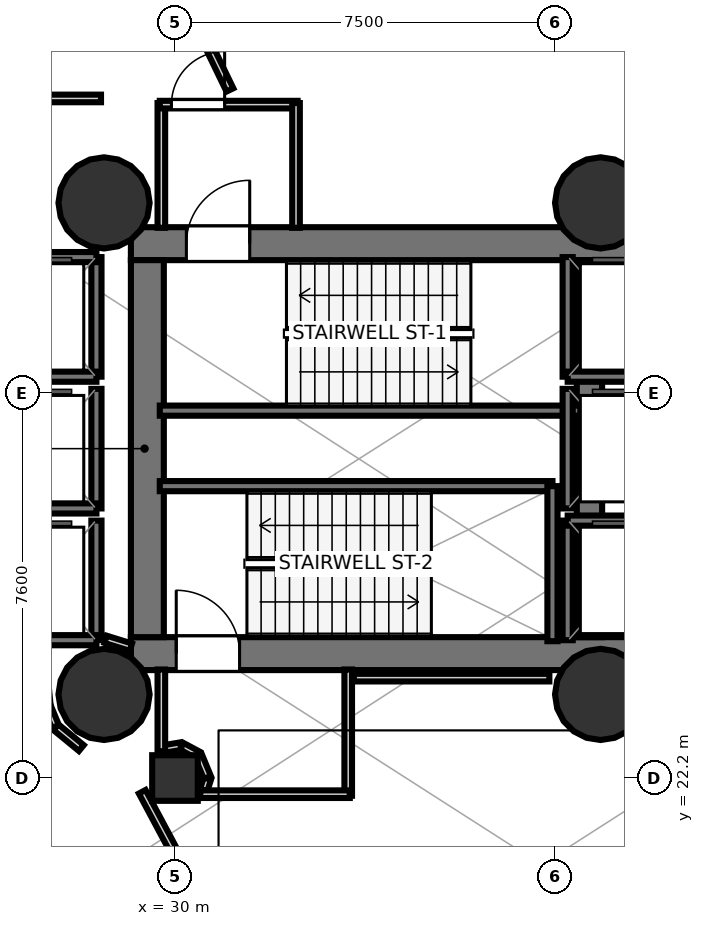
"""IFC4 building model, lengths in metres.
Left out: names, types, materials, properties, quantities, classifications, styles, units other than length and angle.
Written with IfcOpenShell. Run it as: python <this file> out.ifc"""

import sys

from ifc_helpers import new_model, si_unit, direction, frame, frame_2d, origin, origin_2d, place, context, subcontext, project, spatial, rectangle, hollow_circle, extrude, element, fill, save


model = new_model("IFC4")
c1 = context("Model", 3, precision=1e-05, world=origin(), true_north=direction((0.0, 1.0)))
c2 = subcontext(c1, "Body", "Model", "MODEL_VIEW")
j1 = project(units=[si_unit("LENGTHUNIT", "METRE"), si_unit("PLANEANGLEUNIT", "RADIAN")], contexts=[c1])
p1 = place(None, origin())
s1 = spatial("IfcSite", under=j1, at=p1, CompositionType="ELEMENT")
p2 = place(p1, origin())
s2 = spatial("IfcBuilding", under=s1, at=p2, CompositionType="ELEMENT")
p3 = place(p2, frame((0.0, 0.0, 15.8)))
s3 = spatial("IfcBuildingStorey", under=s2, at=p3, CompositionType="ELEMENT", Elevation=15.8)
p4 = place(p3, frame((29.13, 32.745, 0.0), z_axis=(0.0, 0.0, 1.0), x_axis=(1.0, 0.0, 0.0)))
e1 = element("IfcWall", 1, at=p4, inside=s3, PredefinedType="SHEAR", context=c2, shape_type="SweptSolid", body=[
    extrude(rectangle(XDim=10.72, YDim=0.65, at=frame_2d((5.36, 0.0))), origin(), (0.0, 0.0, 1.0), 4.5),
])
p5 = place(p4, frame((1.095, 0.0, 0.0)))
e2 = element("IfcOpeningElement", 2, at=p5, cuts=e1, PredefinedType="OPENING", context=c2, shape_type="SweptSolid", body=[
    extrude(rectangle(XDim=1.25, YDim=2.15, at=frame_2d((0.625, 1.075))), frame((0.0, 0.335, 0.0), z_axis=(0.0, -1.0, 0.0), x_axis=(1.0, 0.0, 0.0)), (0.0, 0.0, 1.0), 0.67),
])
p6 = place(p3, frame((29.13, 24.655, 0.0), z_axis=(0.0, 0.0, 1.0), x_axis=(1.0, 0.0, 0.0)))
e3 = element("IfcWall", 3, at=p6, inside=s3, PredefinedType="SHEAR", context=c2, shape_type="SweptSolid", body=[
    extrude(rectangle(XDim=10.72, YDim=0.65, at=frame_2d((5.36, 0.0))), origin(), (0.0, 0.0, 1.0), 4.5),
])
p7 = place(p6, frame((0.895, 0.0, 0.0)))
e4 = element("IfcOpeningElement", 4, at=p7, cuts=e3, PredefinedType="OPENING", context=c2, shape_type="SweptSolid", body=[
    extrude(rectangle(XDim=1.25, YDim=2.15, at=frame_2d((0.625, 1.075))), frame((0.0, 0.335, 0.0), z_axis=(0.0, -1.0, 0.0), x_axis=(1.0, 0.0, 0.0)), (0.0, 0.0, 1.0), 0.67),
])
p8 = place(p3, frame((29.455, 24.98, 0.0), z_axis=(0.0, 0.0, 1.0), x_axis=(0.0, 1.0, 0.0)))
e5 = element("IfcWall", 5, at=p8, inside=s3, PredefinedType="SHEAR", context=c2, shape_type="SweptSolid", body=[
    extrude(rectangle(XDim=7.44, YDim=0.65, at=frame_2d((3.72, 0.0))), origin(), (0.0, 0.0, 1.0), 4.5),
])
p9 = place(p3, frame((38.18, 24.98, 0.0), z_axis=(0.0, 0.0, 1.0), x_axis=(0.0, 1.0, 0.0)))
e6 = element("IfcWall", 6, at=p9, inside=s3, PredefinedType="SHEAR", context=c2, shape_type="SweptSolid", body=[
    extrude(rectangle(XDim=7.44, YDim=0.5, at=frame_2d((3.72, 0.0))), origin(), (0.0, 0.0, 1.0), 4.5),
])
for number, where, z_axis, x_axis in (
    (7, (28.6, 33.55, 0.0), (0.0, 0.0, 1.0), (1.0, 0.0, 0.0)),
    (8, (28.6, 23.85, 0.0), (0.0, 0.0, 1.0), (1.0, 0.0, 0.0)),
    (9, (38.4, 33.55, 0.0), (0.0, 0.0, 1.0), (1.0, 0.0, 0.0)),
    (10, (38.4, 23.85, 0.0), (0.0, 0.0, 1.0), (1.0, 0.0, 0.0)),
):
    element("IfcColumn", number, at=place(p3, frame(where, z_axis=z_axis, x_axis=x_axis)), inside=s3, PredefinedType="COLUMN", context=c2, shape_type="SweptSolid", body=[
        extrude(hollow_circle(Radius=0.9, WallThickness=0.045, at=origin_2d()), origin(), (0.0, 0.0, 1.0), 4.8),
    ])
p10 = place(p3, frame((30.0, 22.2, 0.0), z_axis=(0.0, 0.0, 1.0), x_axis=(1.0, 0.0, 0.0)))
e11 = element("IfcColumn", 11, at=p10, inside=s3, PredefinedType="COLUMN", context=c2, shape_type="SweptSolid", body=[
    extrude(rectangle(XDim=0.9, YDim=0.9, at=origin_2d()), origin(), (0.0, 0.0, 1.0), 4.8),
])
p11 = place(p3, frame((29.7, 29.45, 0.0), z_axis=(0.0, 0.0, 1.0), x_axis=(1.0, 0.0, 0.0)))
e12 = element("IfcWall", 12, at=p11, inside=s3, PredefinedType="SOLIDWALL", context=c2, shape_type="SweptSolid", body=[
    extrude(rectangle(XDim=8.3, YDim=0.2, at=frame_2d((4.15, 0.0))), origin(), (0.0, 0.0, 1.0), 4.5),
])
p12 = place(p3, frame((29.7, 27.96, 0.0), z_axis=(0.0, 0.0, 1.0), x_axis=(1.0, 0.0, 0.0)))
e13 = element("IfcWall", 13, at=p12, inside=s3, PredefinedType="SOLIDWALL", context=c2, shape_type="SweptSolid", body=[
    extrude(rectangle(XDim=7.75, YDim=0.2, at=frame_2d((3.875, 0.0))), origin(), (0.0, 0.0, 1.0), 4.5),
])
p13 = place(p3, frame((37.45, 24.9, 0.0), z_axis=(0.0, 0.0, 1.0), x_axis=(0.0, 1.0, 0.0)))
e14 = element("IfcWall", 14, at=p13, inside=s3, PredefinedType="SOLIDWALL", context=c2, shape_type="SweptSolid", body=[
    extrude(rectangle(XDim=3.06, YDim=0.2, at=frame_2d((1.53, 0.0))), origin(), (0.0, 0.0, 1.0), 4.5),
])
p14 = place(p3, frame((37.75, 30.12, 0.0), z_axis=(0.0, 0.0, 1.0), x_axis=(0.0, 1.0, 0.0)))
e15 = element("IfcWall", 15, at=p14, inside=s3, PredefinedType="SOLIDWALL", context=c2, shape_type="SweptSolid", body=[
    extrude(rectangle(XDim=2.36, YDim=0.2, at=frame_2d((1.18, 0.0))), origin(), (0.0, 0.0, 1.0), 4.5),
])
p15 = place(p3, frame((37.75, 30.12, 0.0), z_axis=(0.0, 0.0, 1.0), x_axis=(1.0, 0.0, 0.0)))
e16 = element("IfcWall", 16, at=p15, inside=s3, PredefinedType="SOLIDWALL", context=c2, shape_type="SweptSolid", body=[
    extrude(rectangle(XDim=2.1, YDim=0.2, at=frame_2d((1.05, 0.0))), origin(), (0.0, 0.0, 1.0), 4.5),
])
p16 = place(p3, frame((37.75, 24.92, 0.0), z_axis=(0.0, 0.0, 1.0), x_axis=(0.0, 1.0, 0.0)))
e17 = element("IfcWall", 17, at=p16, inside=s3, PredefinedType="SOLIDWALL", context=c2, shape_type="SweptSolid", body=[
    extrude(rectangle(XDim=2.36, YDim=0.2, at=frame_2d((1.18, 0.0))), origin(), (0.0, 0.0, 1.0), 4.5),
])
p17 = place(p3, frame((37.75, 27.28, 0.0), z_axis=(0.0, 0.0, 1.0), x_axis=(1.0, 0.0, 0.0)))
e18 = element("IfcWall", 18, at=p17, inside=s3, PredefinedType="SOLIDWALL", context=c2, shape_type="SweptSolid", body=[
    extrude(rectangle(XDim=2.1, YDim=0.2, at=frame_2d((1.05, 0.0))), origin(), (0.0, 0.0, 1.0), 4.5),
])
p18 = place(p3, frame((28.45, 30.12, 0.0), z_axis=(0.0, 0.0, 1.0), x_axis=(0.0, 1.0, 0.0)))
e19 = element("IfcWall", 19, at=p18, inside=s3, PredefinedType="SOLIDWALL", context=c2, shape_type="SweptSolid", body=[
    extrude(rectangle(XDim=2.36, YDim=0.2, at=frame_2d((1.18, 0.0))), origin(), (0.0, 0.0, 1.0), 4.5),
])
for number, where, z_axis, x_axis in (
    (20, (26.35, 32.48, 0.0), (0.0, 0.0, 1.0), (1.0, 0.0, 0.0)),
    (21, (26.35, 30.12, 0.0), (0.0, 0.0, 1.0), (1.0, 0.0, 0.0)),
):
    element("IfcWall", number, at=place(p3, frame(where, z_axis=z_axis, x_axis=x_axis)), inside=s3, PredefinedType="SOLIDWALL", context=c2, shape_type="SweptSolid", body=[
        extrude(rectangle(XDim=2.1, YDim=0.2, at=frame_2d((1.05, 0.0))), origin(), (0.0, 0.0, 1.0), 4.5),
    ])
p19 = place(p3, frame((28.45, 27.52, 0.0), z_axis=(0.0, 0.0, 1.0), x_axis=(0.0, 1.0, 0.0)))
e22 = element("IfcWall", 22, at=p19, inside=s3, PredefinedType="SOLIDWALL", context=c2, shape_type="SweptSolid", body=[
    extrude(rectangle(XDim=2.36, YDim=0.2, at=frame_2d((1.18, 0.0))), origin(), (0.0, 0.0, 1.0), 4.5),
])
p20 = place(p3, frame((26.35, 27.52, 0.0), z_axis=(0.0, 0.0, 1.0), x_axis=(1.0, 0.0, 0.0)))
e23 = element("IfcWall", 23, at=p20, inside=s3, PredefinedType="SOLIDWALL", context=c2, shape_type="SweptSolid", body=[
    extrude(rectangle(XDim=2.1, YDim=0.2, at=frame_2d((1.05, 0.0))), origin(), (0.0, 0.0, 1.0), 4.5),
])
p21 = place(p3, frame((28.45, 24.92, 0.0), z_axis=(0.0, 0.0, 1.0), x_axis=(0.0, 1.0, 0.0)))
e24 = element("IfcWall", 24, at=p21, inside=s3, PredefinedType="SOLIDWALL", context=c2, shape_type="SweptSolid", body=[
    extrude(rectangle(XDim=2.36, YDim=0.2, at=frame_2d((1.18, 0.0))), origin(), (0.0, 0.0, 1.0), 4.5),
])
p22 = place(p3, frame((26.35, 24.92, 0.0), z_axis=(0.0, 0.0, 1.0), x_axis=(1.0, 0.0, 0.0)))
e25 = element("IfcWall", 25, at=p22, inside=s3, PredefinedType="SOLIDWALL", context=c2, shape_type="SweptSolid", body=[
    extrude(rectangle(XDim=2.1, YDim=0.2, at=frame_2d((1.05, 0.0))), origin(), (0.0, 0.0, 1.0), 4.5),
])
p23 = place(p3, frame((37.75, 27.52, 0.0), z_axis=(0.0, 0.0, 1.0), x_axis=(0.0, 1.0, 0.0)))
e26 = element("IfcWall", 26, at=p23, inside=s3, PredefinedType="SOLIDWALL", context=c2, shape_type="SweptSolid", body=[
    extrude(rectangle(XDim=2.36, YDim=0.2, at=frame_2d((1.18, 0.0))), origin(), (0.0, 0.0, 1.0), 4.5),
])
p24 = place(p3, frame((29.731, 33.058, 0.0), z_axis=(0.0, 0.0, 1.0), x_axis=(0.0, 1.0, 0.0)))
e27 = element("IfcWall", 27, at=p24, inside=s3, PredefinedType="PARTITIONING", context=c2, shape_type="SweptSolid", body=[
    extrude(rectangle(XDim=2.462, YDim=0.15, at=frame_2d((1.231, 0.0))), origin(), (0.0, 0.0, 1.0), 3.02),
])
p25 = place(p3, frame((29.7, 35.489, 0.0), z_axis=(0.0, 0.0, 1.0), x_axis=(1.0, 0.0, 0.0)))
e28 = element("IfcWall", 28, at=p25, inside=s3, PredefinedType="PARTITIONING", context=c2, shape_type="SweptSolid", body=[
    extrude(rectangle(XDim=2.72, YDim=0.15, at=frame_2d((1.36, 0.0))), origin(), (0.0, 0.0, 1.0), 3.02),
])
p26 = place(p25, frame((0.23, 0.0, 0.0)))
e29 = element("IfcOpeningElement", 29, at=p26, cuts=e28, PredefinedType="OPENING", context=c2, shape_type="SweptSolid", body=[
    extrude(rectangle(XDim=1.05, YDim=2.15, at=frame_2d((0.525, 1.075))), frame((0.0, 0.085, 0.0), z_axis=(0.0, -1.0, 0.0), x_axis=(1.0, 0.0, 0.0)), (0.0, 0.0, 1.0), 0.17),
])
p27 = place(p3, frame((32.389, 35.52, 0.0), z_axis=(0.0, 0.0, 1.0), x_axis=(0.0, -1.0, 0.0)))
e30 = element("IfcWall", 30, at=p27, inside=s3, PredefinedType="PARTITIONING", context=c2, shape_type="SweptSolid", body=[
    extrude(rectangle(XDim=2.462, YDim=0.15, at=frame_2d((1.231, 0.0))), origin(), (0.0, 0.0, 1.0), 3.02),
])
p28 = place(p3, frame((30.567, 21.964, 0.0), z_axis=(0.0, 0.0, 1.0), x_axis=(0.304515297416, 0.952507445451, 0.0)))
e31 = element("IfcWall", 31, at=p28, inside=s3, PredefinedType="PARTITIONING", context=c2, shape_type="SweptSolid", body=[
    extrude(rectangle(XDim=0.238, YDim=0.15, at=frame_2d((0.119, 0.0))), origin(), (0.0, 0.0, 1.0), 3.02),
])
p29 = place(p3, frame((30.639, 22.212, 0.0), z_axis=(0.0, 0.0, 1.0), x_axis=(-0.382721202621, 0.923863886655, 0.0)))
e32 = element("IfcWall", 32, at=p29, inside=s3, PredefinedType="PARTITIONING", context=c2, shape_type="SweptSolid", body=[
    extrude(rectangle(XDim=0.467, YDim=0.15, at=frame_2d((0.233, 0.0))), origin(), (0.0, 0.0, 1.0), 3.02),
])
p30 = place(p3, frame((30.446, 22.659, 0.0), z_axis=(0.0, 0.0, 1.0), x_axis=(-0.881817981942, 0.471589913721, 0.0)))
e33 = element("IfcWall", 33, at=p30, inside=s3, PredefinedType="PARTITIONING", context=c2, shape_type="SweptSolid", body=[
    extrude(rectangle(XDim=0.354, YDim=0.15, at=frame_2d((0.177, 0.0))), origin(), (0.0, 0.0, 1.0), 3.02),
])
p31 = place(p3, frame((30.114, 22.829, 0.0), z_axis=(0.0, 0.0, 1.0), x_axis=(-0.986222627979, -0.165423480989, 0.0)))
e34 = element("IfcWall", 34, at=p31, inside=s3, PredefinedType="PARTITIONING", context=c2, shape_type="SweptSolid", body=[
    extrude(rectangle(XDim=0.425, YDim=0.15, at=frame_2d((0.212, 0.0))), origin(), (0.0, 0.0, 1.0), 3.02),
])
p32 = place(p3, frame((29.731, 22.728, 0.0), z_axis=(0.0, 0.0, 1.0), x_axis=(0.0, 1.0, 0.0)))
e35 = element("IfcWall", 35, at=p32, inside=s3, PredefinedType="PARTITIONING", context=c2, shape_type="SweptSolid", body=[
    extrude(rectangle(XDim=1.614, YDim=0.15, at=frame_2d((0.807, 0.0))), origin(), (0.0, 0.0, 1.0), 3.02),
])
p33 = place(p3, frame((33.419, 24.342, 0.0), z_axis=(0.0, 0.0, 1.0), x_axis=(0.0, -1.0, 0.0)))
e36 = element("IfcWall", 36, at=p33, inside=s3, PredefinedType="PARTITIONING", context=c2, shape_type="SweptSolid", body=[
    extrude(rectangle(XDim=2.492, YDim=0.15, at=frame_2d((1.246, 0.0))), origin(), (0.0, 0.0, 1.0), 3.02),
])
p34 = place(p3, frame((33.45, 21.881, 0.0), z_axis=(0.0, 0.0, 1.0), x_axis=(-1.0, 0.0, 0.0)))
e37 = element("IfcWall", 37, at=p34, inside=s3, PredefinedType="PARTITIONING", context=c2, shape_type="SweptSolid", body=[
    extrude(rectangle(XDim=2.952, YDim=0.15, at=frame_2d((1.476, 0.0))), origin(), (0.0, 0.0, 1.0), 3.02),
])
p35 = place(p3, frame((29.13, 24.782, 0.0), z_axis=(0.0, 0.0, 1.0), x_axis=(-0.955000482512, 0.296604245422, 0.0)))
e38 = element("IfcWall", 38, at=p35, inside=s3, PredefinedType="PARTITIONING", context=c2, shape_type="SweptSolid", body=[
    extrude(rectangle(XDim=0.524, YDim=0.15, at=frame_2d((0.262, 0.0))), origin(), (0.0, 0.0, 1.0), 3.02),
])
p36 = place(p3, frame((37.389, 24.181, 0.0), z_axis=(0.0, 0.0, 1.0), x_axis=(-1.0, 0.0, 0.0)))
e39 = element("IfcWall", 39, at=p36, inside=s3, PredefinedType="PARTITIONING", context=c2, shape_type="SweptSolid", body=[
    extrude(rectangle(XDim=3.859, YDim=0.15, at=frame_2d((1.929, 0.0))), origin(), (0.0, 0.0, 1.0), 3.02),
])
p37 = place(p3, frame((30.258, 37.487, 0.0), z_axis=(0.0, 0.0, 1.0), x_axis=(0.435698821732, -0.900092515657, 0.0)))
e40 = element("IfcWall", 40, at=p37, inside=s3, PredefinedType="PARTITIONING", context=c2, shape_type="SweptSolid", body=[
    extrude(rectangle(XDim=1.897, YDim=0.15, at=frame_2d((0.949, 0.0))), origin(), (0.0, 0.0, 1.0), 3.02),
])
p38 = place(p3, frame((28.54, 35.611, 0.0), z_axis=(0.0, 0.0, 1.0), x_axis=(-1.0, 0.0, 0.0)))
e41 = element("IfcWall", 41, at=p38, inside=s3, PredefinedType="PARTITIONING", context=c2, shape_type="SweptSolid", body=[
    extrude(rectangle(XDim=1.69, YDim=0.15, at=frame_2d((0.845, 0.0))), origin(), (0.0, 0.0, 1.0), 3.02),
])
p39 = place(p3, frame((27.473, 23.62, 0.0), z_axis=(0.0, 0.0, 1.0), x_axis=(0.382631351728, -0.923901103298, 0.0)))
e42 = element("IfcWall", 42, at=p39, inside=s3, PredefinedType="PARTITIONING", context=c2, shape_type="SweptSolid", body=[
    extrude(rectangle(XDim=0.437, YDim=0.15, at=frame_2d((0.219, 0.0))), origin(), (0.0, 0.0, 1.0), 3.02),
])
p40 = place(p3, frame((27.649, 23.204, 0.0), z_axis=(0.0, 0.0, 1.0), x_axis=(0.772818338666, -0.634627304346, 0.0)))
e43 = element("IfcWall", 43, at=p40, inside=s3, PredefinedType="PARTITIONING", context=c2, shape_type="SweptSolid", body=[
    extrude(rectangle(XDim=0.65, YDim=0.15, at=frame_2d((0.325, 0.0))), origin(), (0.0, 0.0, 1.0), 3.02),
])
p41 = place(p3, frame((29.354, 21.929, 0.0), z_axis=(0.0, 0.0, 1.0), x_axis=(0.471375681313, -0.881932518432, 0.0)))
e44 = element("IfcWall", 44, at=p41, inside=s3, PredefinedType="PARTITIONING", context=c2, shape_type="SweptSolid", body=[
    extrude(rectangle(XDim=2.059, YDim=0.15, at=frame_2d((1.03, 0.0))), origin(), (0.0, 0.0, 1.0), 3.02),
])
p42 = place(p3, frame((27.919, 20.397, 0.0), z_axis=(0.0, 0.0, 1.0), x_axis=(-0.932053116436, 0.362321663915, 0.0)))
e45 = element("IfcWall", 45, at=p42, inside=s3, PredefinedType="PARTITIONING", context=c2, shape_type="SweptSolid", body=[
    extrude(rectangle(XDim=1.135, YDim=0.15, at=frame_2d((0.567, 0.0))), origin(), (0.0, 0.0, 1.0), 3.02),
])
p43 = place(p5, origin())
e46 = element("IfcDoor", 46, at=p43, inside=s3, OperationType="SINGLE_SWING_RIGHT", PredefinedType="DOOR", context=c2, shape_type="SweptSolid", body=[
    extrude(rectangle(XDim=1.25, YDim=2.15, at=frame_2d((0.625, 1.075))), frame((0.0, 0.025, 0.0), z_axis=(0.0, -1.0, 0.0), x_axis=(1.0, 0.0, 0.0)), (0.0, 0.0, 1.0), 0.05),
])
fill(e2, e46)
p44 = place(p7, origin())
e47 = element("IfcDoor", 47, at=p44, inside=s3, OperationType="SINGLE_SWING_LEFT", PredefinedType="DOOR", context=c2, shape_type="SweptSolid", body=[
    extrude(rectangle(XDim=1.25, YDim=2.15, at=frame_2d((0.625, 1.075))), frame((0.0, 0.025, 0.0), z_axis=(0.0, -1.0, 0.0), x_axis=(1.0, 0.0, 0.0)), (0.0, 0.0, 1.0), 0.05),
])
fill(e4, e47)
p45 = place(p26, origin())
e48 = element("IfcDoor", 48, at=p45, inside=s3, OperationType="SINGLE_SWING_RIGHT", PredefinedType="DOOR", context=c2, shape_type="SweptSolid", body=[
    extrude(rectangle(XDim=1.05, YDim=2.15, at=frame_2d((0.525, 1.075))), frame((0.0, 0.025, 0.0), z_axis=(0.0, -1.0, 0.0), x_axis=(1.0, 0.0, 0.0)), (0.0, 0.0, 1.0), 0.05),
])
fill(e29, e48)
save(model, sys.argv[1])
